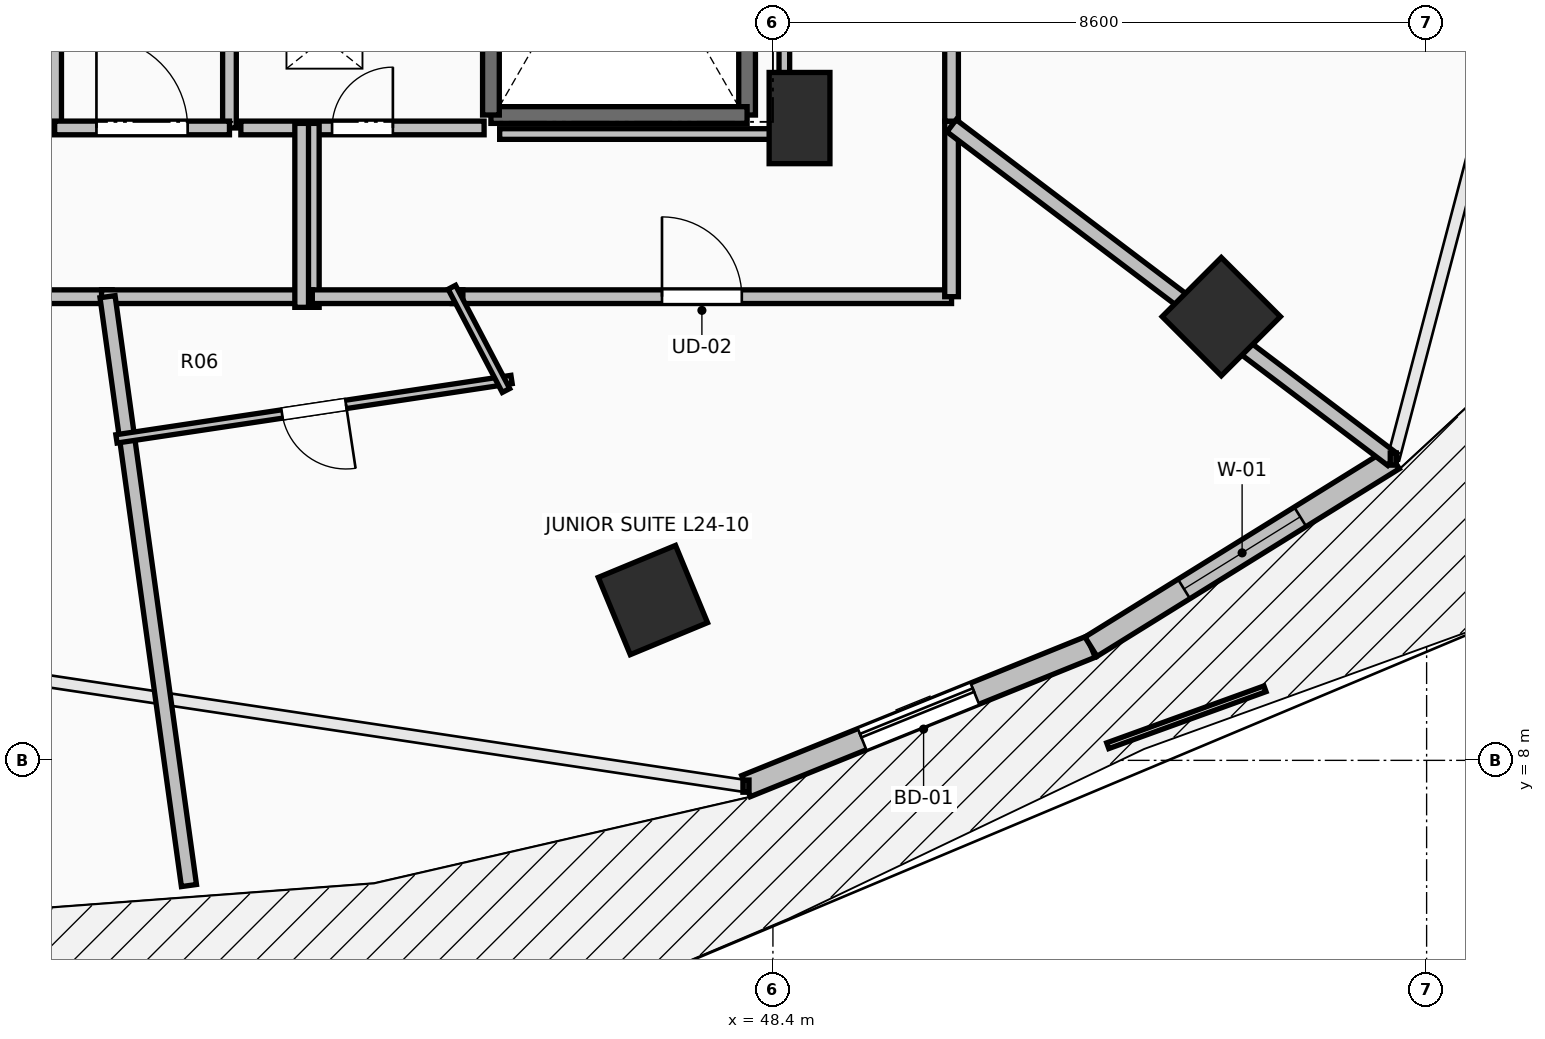
"""IFC4 building model, lengths in metres.
Left out: names, types, materials, properties, quantities, classifications, styles, units other than length and angle.
Written with IfcOpenShell. Run it as: python <this file> out.ifc"""

import sys

from ifc_helpers import new_model, si_unit, direction, frame, frame_2d, origin, origin_2d, place, context, subcontext, project, spatial, rectangle, extrude, element, fill, save


model = new_model("IFC4")
c1 = context("Model", 3, precision=1e-05, world=origin(), true_north=direction((0.0, 1.0)))
c2 = subcontext(c1, "Body", "Model", "MODEL_VIEW")
j1 = project(units=[si_unit("LENGTHUNIT", "METRE"), si_unit("PLANEANGLEUNIT", "RADIAN")], contexts=[c1])
p1 = place(None, origin())
s1 = spatial("IfcSite", under=j1, at=p1, CompositionType="ELEMENT")
p2 = place(p1, origin())
s2 = spatial("IfcBuilding", under=s1, at=p2, CompositionType="ELEMENT")
p3 = place(p2, frame((0.0, 0.0, 92.8)))
s3 = spatial("IfcBuildingStorey", under=s2, at=p3, CompositionType="ELEMENT", Elevation=92.8)
for number, where, z_axis, x_axis in (
    (1, (46.821, 10.109, 0.0), (0.0, 0.0, 1.0), (0.383, -0.924, 0.0)),
    (2, (54.299, 13.838, 0.0), (0.0, 0.0, 1.0), (0.707, -0.707, 0.0)),
):
    element("IfcColumn", number, at=place(p3, frame(where, z_axis=z_axis, x_axis=x_axis)), inside=s3, PredefinedType="COLUMN", context=c2, shape_type="SweptSolid", body=[
        extrude(rectangle(XDim=1.1, YDim=1.1, at=origin_2d()), origin(), (0.0, 0.0, 1.0), 3.5),
    ])
p4 = place(p3, frame((48.75, 16.45, 0.0), z_axis=(0.0, 0.0, 1.0), x_axis=(1.0, 0.0, 0.0)))
e3 = element("IfcColumn", 3, at=p4, inside=s3, PredefinedType="PILASTER", context=c2, shape_type="SweptSolid", body=[
    extrude(rectangle(XDim=0.8, YDim=1.2, at=origin_2d()), origin(), (0.0, 0.0, 1.0), 3.5),
])
p5 = place(p3, frame((48.045, 7.661, 0.0), z_axis=(0.0, 0.0, 1.0), x_axis=(0.927122233109, 0.374759075775, 0.0)))
e4 = element("IfcWall", 4, at=p5, inside=s3, PredefinedType="STANDARD", context=c2, shape_type="SweptSolid", body=[
    extrude(rectangle(XDim=4.895, YDim=0.3, at=frame_2d((2.448, 0.0))), origin(), (0.0, 0.0, 1.0), 3.24),
])
p6 = place(p5, frame((1.647, 0.0, 0.0)))
e5 = element("IfcOpeningElement", 5, at=p6, cuts=e4, PredefinedType="OPENING", context=c2, shape_type="SweptSolid", body=[
    extrude(rectangle(XDim=1.6, YDim=2.3, at=frame_2d((0.8, 1.15))), frame((0.0, 0.165, 0.0), z_axis=(0.0, -1.0, 0.0), x_axis=(1.0, 0.0, 0.0)), (0.0, 0.0, 1.0), 0.33),
])
p7 = place(p3, frame((52.584, 9.495, 0.0), z_axis=(0.0, 0.0, 1.0), x_axis=(0.849684479743, 0.527291461038, 0.0)))
e6 = element("IfcWall", 6, at=p7, inside=s3, PredefinedType="STANDARD", context=c2, shape_type="SweptSolid", body=[
    extrude(rectangle(XDim=4.681, YDim=0.3, at=frame_2d((2.341, 0.0))), origin(), (0.0, 0.0, 1.0), 3.24),
])
p8 = place(p7, frame((1.441, 0.0, 0.85)))
e7 = element("IfcOpeningElement", 7, at=p8, cuts=e6, PredefinedType="OPENING", context=c2, shape_type="SweptSolid", body=[
    extrude(rectangle(XDim=1.8, YDim=2.19, at=frame_2d((0.9, 1.095))), frame((0.0, 0.165, 0.0), z_axis=(0.0, -1.0, 0.0), x_axis=(1.0, 0.0, 0.0)), (0.0, 0.0, 1.0), 0.33),
])
p9 = place(p3, frame((48.06, 23.91, 0.0), z_axis=(0.0, 0.0, 1.0), x_axis=(0.0, -1.0, 0.0)))
e8 = element("IfcWall", 8, at=p9, inside=s3, PredefinedType="SOLIDWALL", context=c2, shape_type="SweptSolid", body=[
    extrude(rectangle(XDim=7.42, YDim=0.22, at=frame_2d((3.71, 0.0))), origin(), (0.0, 0.0, 1.0), 3.24),
])
p10 = place(p3, frame((48.06, 16.49, 0.0), z_axis=(0.0, 0.0, 1.0), x_axis=(-1.0, 0.0, 0.0)))
e9 = element("IfcWall", 9, at=p10, inside=s3, PredefinedType="SOLIDWALL", context=c2, shape_type="SweptSolid", body=[
    extrude(rectangle(XDim=3.37, YDim=0.22, at=frame_2d((1.685, 0.0))), origin(), (0.0, 0.0, 1.0), 3.24),
])
p11 = place(p3, frame((44.69, 16.49, 0.0), z_axis=(0.0, 0.0, 1.0), x_axis=(0.0, 1.0, 0.0)))
e10 = element("IfcWall", 10, at=p11, inside=s3, PredefinedType="SOLIDWALL", context=c2, shape_type="SweptSolid", body=[
    extrude(rectangle(XDim=7.42, YDim=0.22, at=frame_2d((3.71, 0.0))), origin(), (0.0, 0.0, 1.0), 3.24),
])
p12 = place(p3, frame((41.25, 16.32, 0.0), z_axis=(0.0, 0.0, 1.0), x_axis=(0.0, 1.0, 0.0)))
e11 = element("IfcWall", 11, at=p12, inside=s3, PredefinedType="PARTITIONING", context=c2, shape_type="SweptSolid", body=[
    extrude(rectangle(XDim=3.985, YDim=0.18, at=frame_2d((1.992, 0.0))), origin(), (0.0, 0.0, 1.0), 3.24),
])
p13 = place(p12, frame((1.593, 0.0, 0.0)))
e12 = element("IfcOpeningElement", 12, at=p13, cuts=e11, PredefinedType="OPENING", context=c2, shape_type="SweptSolid", body=[
    extrude(rectangle(XDim=0.8, YDim=2.05, at=frame_2d((0.4, 1.025))), frame((0.0, 0.105, 0.0), z_axis=(0.0, -1.0, 0.0), x_axis=(1.0, 0.0, 0.0)), (0.0, 0.0, 1.0), 0.21),
])
p14 = place(p3, frame((38.95, 21.755, 0.0), z_axis=(0.0, 0.0, 1.0), x_axis=(0.0, -1.0, 0.0)))
e13 = element("IfcWall", 13, at=p14, inside=s3, PredefinedType="PARTITIONING", context=c2, shape_type="SweptSolid", body=[
    extrude(rectangle(XDim=5.435, YDim=0.18, at=frame_2d((2.717, 0.0))), origin(), (0.0, 0.0, 1.0), 3.24),
])
p15 = place(p14, frame((2.292, 0.0, 0.0)))
e14 = element("IfcOpeningElement", 14, at=p15, cuts=e13, PredefinedType="OPENING", context=c2, shape_type="SweptSolid", body=[
    extrude(rectangle(XDim=0.85, YDim=2.1, at=frame_2d((0.425, 1.05))), frame((0.0, 0.105, 0.0), z_axis=(0.0, -1.0, 0.0), x_axis=(1.0, 0.0, 0.0)), (0.0, 0.0, 1.0), 0.21),
])
p16 = place(p3, frame((38.95, 16.32, 0.0), z_axis=(0.0, 0.0, 1.0), x_axis=(1.0, 0.0, 0.0)))
e15 = element("IfcWall", 15, at=p16, inside=s3, PredefinedType="PARTITIONING", context=c2, shape_type="SweptSolid", body=[
    extrude(rectangle(XDim=2.3, YDim=0.18, at=frame_2d((1.15, 0.0))), origin(), (0.0, 0.0, 1.0), 3.24),
])
p17 = place(p16, frame((0.55, 0.0, 0.0)))
e16 = element("IfcOpeningElement", 16, at=p17, cuts=e15, PredefinedType="OPENING", context=c2, shape_type="SweptSolid", body=[
    extrude(rectangle(XDim=1.2, YDim=2.15, at=frame_2d((0.6, 1.075))), frame((0.0, 0.105, 0.0), z_axis=(0.0, -1.0, 0.0), x_axis=(1.0, 0.0, 0.0)), (0.0, 0.0, 1.0), 0.21),
])
p18 = place(p3, frame((41.4, 16.32, 0.0), z_axis=(0.0, 0.0, 1.0), x_axis=(1.0, 0.0, 0.0)))
e17 = element("IfcWall", 17, at=p18, inside=s3, PredefinedType="PARTITIONING", context=c2, shape_type="SweptSolid", body=[
    extrude(rectangle(XDim=3.2, YDim=0.18, at=frame_2d((1.6, 0.0))), origin(), (0.0, 0.0, 1.0), 3.24),
])
p19 = place(p18, frame((1.2, 0.0, 0.0)))
e18 = element("IfcOpeningElement", 18, at=p19, cuts=e17, PredefinedType="OPENING", context=c2, shape_type="SweptSolid", body=[
    extrude(rectangle(XDim=0.8, YDim=2.05, at=frame_2d((0.4, 1.025))), frame((0.0, 0.105, 0.0), z_axis=(0.0, -1.0, 0.0), x_axis=(1.0, 0.0, 0.0)), (0.0, 0.0, 1.0), 0.21),
])
p20 = place(p3, frame((36.068, 14.1, 0.0), z_axis=(0.0, 0.0, 1.0), x_axis=(1.0, 0.0, 0.0)))
e19 = element("IfcWall", 19, at=p20, inside=s3, PredefinedType="PARTITIONING", context=c2, shape_type="SweptSolid", body=[
    extrude(rectangle(XDim=3.639, YDim=0.18, at=frame_2d((1.819, 0.0))), origin(), (0.0, 0.0, 1.0), 2.972),
])
p21 = place(p20, frame((1.32, 0.0, 0.0)))
e20 = element("IfcOpeningElement", 20, at=p21, cuts=e19, PredefinedType="OPENING", context=c2, shape_type="SweptSolid", body=[
    extrude(rectangle(XDim=1.0, YDim=2.15, at=frame_2d((0.5, 1.075))), frame((0.0, 0.105, 0.0), z_axis=(0.0, -1.0, 0.0), x_axis=(1.0, 0.0, 0.0)), (0.0, 0.0, 1.0), 0.21),
])
p22 = place(p3, frame((44.181, 14.1, 0.0), z_axis=(0.0, 0.0, 1.0), x_axis=(1.0, 0.0, 0.0)))
e21 = element("IfcWall", 21, at=p22, inside=s3, PredefinedType="PARTITIONING", context=c2, shape_type="SweptSolid", body=[
    extrude(rectangle(XDim=6.569, YDim=0.18, at=frame_2d((3.285, 0.0))), origin(), (0.0, 0.0, 1.0), 2.432),
])
p23 = place(p22, frame((2.76, 0.0, 0.0)))
e22 = element("IfcOpeningElement", 22, at=p23, cuts=e21, PredefinedType="OPENING", context=c2, shape_type="SweptSolid", body=[
    extrude(rectangle(XDim=1.05, YDim=2.2, at=frame_2d((0.525, 1.1))), frame((0.0, 0.105, 0.0), z_axis=(0.0, -1.0, 0.0), x_axis=(1.0, 0.0, 0.0)), (0.0, 0.0, 1.0), 0.21),
])
p24 = place(p3, frame((50.75, 14.1, 0.0), z_axis=(0.0, 0.0, 1.0), x_axis=(0.0, 1.0, 0.0)))
e23 = element("IfcWall", 23, at=p24, inside=s3, PredefinedType="PARTITIONING", context=c2, shape_type="SweptSolid", body=[
    extrude(rectangle(XDim=2.309, YDim=0.18, at=frame_2d((1.154, 0.0))), origin(), (0.0, 0.0, 1.0), 2.432),
])
p25 = place(p3, frame((42.34, 16.38, 0.0), z_axis=(0.0, 0.0, 1.0), x_axis=(0.0, -1.0, 0.0)))
e24 = element("IfcWall", 24, at=p25, inside=s3, PredefinedType="PARTITIONING", context=c2, shape_type="SweptSolid", body=[
    extrude(rectangle(XDim=2.42, YDim=0.18, at=frame_2d((1.21, 0.0))), origin(), (0.0, 0.0, 1.0), 2.972),
])
p26 = place(p3, frame((42.2, 14.1, 0.0), z_axis=(0.0, 0.0, 1.0), x_axis=(1.0, 0.0, 0.0)))
e25 = element("IfcWall", 25, at=p26, inside=s3, PredefinedType="PARTITIONING", context=c2, shape_type="SweptSolid", body=[
    extrude(rectangle(XDim=2.121, YDim=0.18, at=frame_2d((1.061, 0.0))), origin(), (0.0, 0.0, 1.0), 2.972),
])
p27 = place(p3, frame((39.567, 14.1, 0.0), z_axis=(0.0, 0.0, 1.0), x_axis=(1.0, 0.0, 0.0)))
e26 = element("IfcWall", 26, at=p27, inside=s3, PredefinedType="PARTITIONING", context=c2, shape_type="SweptSolid", body=[
    extrude(rectangle(XDim=2.773, YDim=0.18, at=frame_2d((1.387, 0.0))), origin(), (0.0, 0.0, 1.0), 2.972),
])
p28 = place(p3, frame((42.2, 13.96, 0.0), z_axis=(0.0, 0.0, 1.0), x_axis=(0.0, 1.0, 0.0)))
e27 = element("IfcWall", 27, at=p28, inside=s3, PredefinedType="PARTITIONING", context=c2, shape_type="SweptSolid", body=[
    extrude(rectangle(XDim=2.42, YDim=0.18, at=frame_2d((1.21, 0.0))), origin(), (0.0, 0.0, 1.0), 2.972),
])
p29 = place(p3, frame((50.75, 16.409, 0.0), z_axis=(0.0, 0.0, 1.0), x_axis=(0.0, 1.0, 0.0)))
e28 = element("IfcWall", 28, at=p29, inside=s3, PredefinedType="PARTITIONING", context=c2, shape_type="SweptSolid", body=[
    extrude(rectangle(XDim=11.155, YDim=0.18, at=frame_2d((5.578, 0.0))), origin(), (0.0, 0.0, 1.0), 2.432),
])
p30 = place(p29, frame((5.077, 0.0, 0.0)))
e29 = element("IfcOpeningElement", 29, at=p30, cuts=e28, PredefinedType="OPENING", context=c2, shape_type="SweptSolid", body=[
    extrude(rectangle(XDim=1.0, YDim=2.15, at=frame_2d((0.5, 1.075))), frame((0.0, 0.105, 0.0), z_axis=(0.0, -1.0, 0.0), x_axis=(1.0, 0.0, 0.0)), (0.0, 0.0, 1.0), 0.21),
])
p31 = place(p3, frame((40.717, 6.353, 0.0), z_axis=(0.0, 0.0, 1.0), x_axis=(-0.136949014068, 0.990578097651, 0.0)))
e30 = element("IfcWall", 30, at=p31, inside=s3, PredefinedType="PARTITIONING", context=c2, shape_type="SweptSolid", body=[
    extrude(rectangle(XDim=7.821, YDim=0.2, at=frame_2d((3.91, 0.0))), origin(), (0.0, 0.0, 1.0), 2.432),
])
p32 = place(p3, frame((44.961, 13.011, 0.0), z_axis=(0.0, 0.0, 1.0), x_axis=(-0.98888518965, -0.148681141008, 0.0)))
e31 = element("IfcWall", 31, at=p32, inside=s3, PredefinedType="PARTITIONING", context=c2, shape_type="SweptSolid", body=[
    extrude(rectangle(XDim=5.256, YDim=0.11, at=frame_2d((2.628, 0.0))), origin(), (0.0, 0.0, 1.0), 2.432),
])
p33 = place(p32, frame((2.203, 0.0, 0.0)))
e32 = element("IfcOpeningElement", 32, at=p33, cuts=e31, PredefinedType="OPENING", context=c2, shape_type="SweptSolid", body=[
    extrude(rectangle(XDim=0.85, YDim=2.1, at=frame_2d((0.425, 1.05))), frame((0.0, 0.07, 0.0), z_axis=(0.0, -1.0, 0.0), x_axis=(1.0, 0.0, 0.0)), (0.0, 0.0, 1.0), 0.14),
])
p34 = place(p3, frame((44.176, 14.224, 0.0), z_axis=(0.0, 0.0, 1.0), x_axis=(0.464262791375, -0.885697499457, 0.0)))
e33 = element("IfcWall", 33, at=p34, inside=s3, PredefinedType="PARTITIONING", context=c2, shape_type="SweptSolid", body=[
    extrude(rectangle(XDim=1.533, YDim=0.11, at=frame_2d((0.767, 0.0))), origin(), (0.0, 0.0, 1.0), 2.432),
])
p35 = place(p3, frame((56.548, 11.96, 0.0), z_axis=(0.0, 0.0, 1.0), x_axis=(-0.797312940684, 0.603566131105, 0.0)))
e34 = element("IfcWall", 34, at=p35, inside=s3, PredefinedType="PARTITIONING", context=c2, shape_type="SweptSolid", body=[
    extrude(rectangle(XDim=7.272, YDim=0.2, at=frame_2d((3.636, 0.0))), origin(), (0.0, 0.0, 1.0), 2.432),
])
p36 = place(p3, frame((48.55, 23.754, 0.0), z_axis=(0.0, 0.0, 1.0), x_axis=(0.0, -1.0, 0.0)))
e35 = element("IfcWall", 35, at=p36, inside=s3, PredefinedType="PARTITIONING", context=c2, shape_type="SweptSolid", body=[
    extrude(rectangle(XDim=7.514, YDim=0.14, at=frame_2d((3.757, 0.0))), origin(), (0.0, 0.0, 1.0), 2.432),
])
p37 = place(p3, frame((48.55, 16.24, 0.0), z_axis=(0.0, 0.0, 1.0), x_axis=(-1.0, 0.0, 0.0)))
e36 = element("IfcWall", 36, at=p37, inside=s3, PredefinedType="PARTITIONING", context=c2, shape_type="SweptSolid", body=[
    extrude(rectangle(XDim=3.745, YDim=0.14, at=frame_2d((1.873, 0.0))), origin(), (0.0, 0.0, 1.0), 2.432),
])
p38 = place(p6, origin())
e37 = element("IfcDoor", 37, at=p38, inside=s3, OperationType="SLIDING_TO_LEFT", PredefinedType="DOOR", context=c2, shape_type="SweptSolid", body=[
    extrude(rectangle(XDim=1.6, YDim=2.3, at=frame_2d((0.8, 1.15))), frame((0.0, 0.025, 0.0), z_axis=(0.0, -1.0, 0.0), x_axis=(1.0, 0.0, 0.0)), (0.0, 0.0, 1.0), 0.05),
])
fill(e5, e37)
p39 = place(p8, origin())
e38 = element("IfcWindow", 38, at=p39, inside=s3, PartitioningType="SINGLE_PANEL", PredefinedType="WINDOW", context=c2, shape_type="SweptSolid", body=[
    extrude(rectangle(XDim=1.8, YDim=2.19, at=frame_2d((0.9, 1.095))), frame((0.0, 0.03, 0.0), z_axis=(0.0, -1.0, 0.0), x_axis=(1.0, 0.0, 0.0)), (0.0, 0.0, 1.0), 0.06),
])
fill(e7, e38)
p40 = place(p17, origin())
e39 = element("IfcDoor", 39, at=p40, inside=s3, OperationType="SINGLE_SWING_LEFT", PredefinedType="DOOR", context=c2, shape_type="SweptSolid", body=[
    extrude(rectangle(XDim=1.2, YDim=2.15, at=frame_2d((0.6, 1.075))), frame((0.0, 0.025, 0.0), z_axis=(0.0, -1.0, 0.0), x_axis=(1.0, 0.0, 0.0)), (0.0, 0.0, 1.0), 0.05),
])
fill(e16, e39)
p41 = place(p19, origin())
e40 = element("IfcDoor", 40, at=p41, inside=s3, OperationType="SINGLE_SWING_RIGHT", PredefinedType="DOOR", context=c2, shape_type="SweptSolid", body=[
    extrude(rectangle(XDim=0.8, YDim=2.05, at=frame_2d((0.4, 1.025))), frame((0.0, 0.025, 0.0), z_axis=(0.0, -1.0, 0.0), x_axis=(1.0, 0.0, 0.0)), (0.0, 0.0, 1.0), 0.05),
])
fill(e18, e40)
p42 = place(p23, origin())
e41 = element("IfcDoor", 41, at=p42, inside=s3, OperationType="SINGLE_SWING_LEFT", PredefinedType="DOOR", context=c2, shape_type="SweptSolid", body=[
    extrude(rectangle(XDim=1.05, YDim=2.2, at=frame_2d((0.525, 1.1))), frame((0.0, 0.025, 0.0), z_axis=(0.0, -1.0, 0.0), x_axis=(1.0, 0.0, 0.0)), (0.0, 0.0, 1.0), 0.05),
])
fill(e22, e41)
p43 = place(p33, origin())
e42 = element("IfcDoor", 42, at=p43, inside=s3, OperationType="SINGLE_SWING_LEFT", PredefinedType="DOOR", context=c2, shape_type="SweptSolid", body=[
    extrude(rectangle(XDim=0.85, YDim=2.1, at=frame_2d((0.425, 1.05))), frame((0.0, 0.025, 0.0), z_axis=(0.0, -1.0, 0.0), x_axis=(1.0, 0.0, 0.0)), (0.0, 0.0, 1.0), 0.05),
])
fill(e32, e42)
save(model, sys.argv[1])
